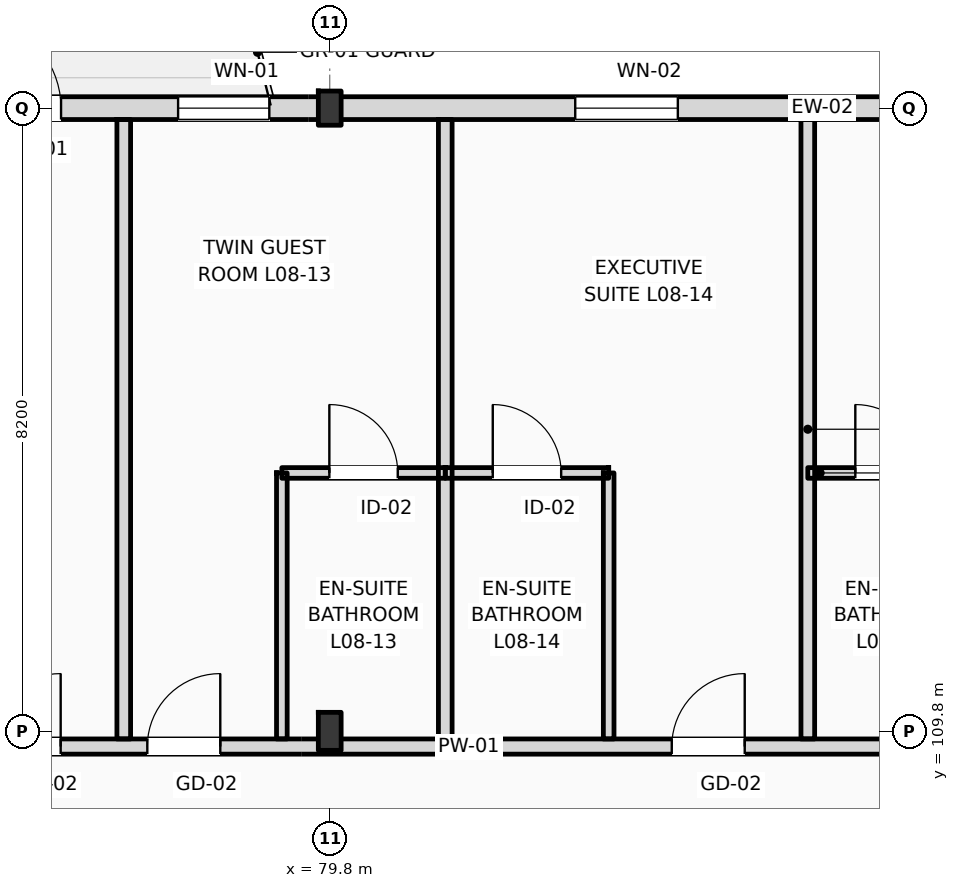
"""IFC4 building model, lengths in metres.
Left out: names, types, materials, properties, quantities, classifications, styles, units other than length and angle.
Written with IfcOpenShell. Run it as: python <this file> out.ifc"""

import sys

from ifc_helpers import new_model, si_unit, direction, frame, frame_2d, origin, origin_2d, place, context, subcontext, project, spatial, rectangle, i_section, extrude, element, fill, save


model = new_model("IFC4")
c1 = context("Model", 3, precision=1e-05, world=origin(), true_north=direction((0.0, 1.0)))
c2 = subcontext(c1, "Body", "Model", "MODEL_VIEW")
j1 = project(units=[si_unit("LENGTHUNIT", "METRE"), si_unit("PLANEANGLEUNIT", "RADIAN")], contexts=[c1])
p1 = place(None, origin())
s1 = spatial("IfcSite", under=j1, at=p1, CompositionType="ELEMENT")
p2 = place(p1, origin())
s2 = spatial("IfcBuilding", under=s1, at=p2, CompositionType="ELEMENT")
p3 = place(p2, frame((0.0, 0.0, 35.4)))
s3 = spatial("IfcBuildingStorey", under=s2, at=p3, CompositionType="ELEMENT", Elevation=35.4)
p4 = place(p3, frame((79.8, 109.8, 0.0), z_axis=(0.0, 0.0, 1.0), x_axis=(1.0, 0.0, 0.0)))
e1 = element("IfcColumn", 1, at=p4, inside=s3, PredefinedType="COLUMN", context=c2, shape_type="SweptSolid", body=[
    extrude(i_section(OverallWidth=0.3, OverallDepth=0.5, WebThickness=0.014, FlangeThickness=0.028, FilletRadius=0.027, at=origin_2d()), origin(), (0.0, 0.0, 1.0), 3.6),
])
p5 = place(p3, frame((79.8, 118.0, 0.0), z_axis=(0.0, 0.0, 1.0), x_axis=(1.0, 0.0, 0.0)))
e2 = element("IfcColumn", 2, at=p5, inside=s3, PredefinedType="COLUMN", context=c2, shape_type="SweptSolid", body=[
    extrude(i_section(OverallWidth=0.3, OverallDepth=0.45, WebThickness=0.014, FlangeThickness=0.026, FilletRadius=0.027, at=origin_2d()), origin(), (0.0, 0.0, 1.0), 3.6),
])
p6 = place(p3, frame((22.5, 118.0, 0.0), z_axis=(0.0, 0.0, 1.0), x_axis=(1.0, 0.0, 0.0)))
e3 = element("IfcWall", 3, at=p6, inside=s3, PredefinedType="STANDARD", context=c2, shape_type="SweptSolid", body=[
    extrude(rectangle(XDim=72.9, YDim=0.3, at=frame_2d((36.45, 0.0))), origin(), (0.0, 0.0, 1.0), 2.92),
])
p7 = place(p6, frame((0.91, 0.0, 0.9)))
e4 = element("IfcOpeningElement", 4, at=p7, cuts=e3, PredefinedType="OPENING", context=c2, shape_type="SweptSolid", body=[
    extrude(rectangle(XDim=0.9, YDim=1.84, at=frame_2d((0.45, 0.92))), frame((0.0, 0.16, 0.0), z_axis=(0.0, -1.0, 0.0), x_axis=(1.0, 0.0, 0.0)), (0.0, 0.0, 1.0), 0.32),
])
p8 = place(p6, frame((6.665, 0.0, 0.0)))
e5 = element("IfcOpeningElement", 5, at=p8, cuts=e3, PredefinedType="OPENING", context=c2, shape_type="SweptSolid", body=[
    extrude(rectangle(XDim=1.2, YDim=2.25, at=frame_2d((0.6, 1.125))), frame((0.0, 0.16, 0.0), z_axis=(0.0, -1.0, 0.0), x_axis=(1.0, 0.0, 0.0)), (0.0, 0.0, 1.0), 0.32),
])
p9 = place(p6, frame((11.355, 0.0, 0.9)))
e6 = element("IfcOpeningElement", 6, at=p9, cuts=e3, PredefinedType="OPENING", context=c2, shape_type="SweptSolid", body=[
    extrude(rectangle(XDim=1.1, YDim=1.5, at=frame_2d((0.55, 0.75))), frame((0.0, 0.16, 0.0), z_axis=(0.0, -1.0, 0.0), x_axis=(1.0, 0.0, 0.0)), (0.0, 0.0, 1.0), 0.32),
])
p10 = place(p6, frame((15.58, 0.0, 0.9)))
e7 = element("IfcOpeningElement", 7, at=p10, cuts=e3, PredefinedType="OPENING", context=c2, shape_type="SweptSolid", body=[
    extrude(rectangle(XDim=1.25, YDim=1.6, at=frame_2d((0.625, 0.8))), frame((0.0, 0.16, 0.0), z_axis=(0.0, -1.0, 0.0), x_axis=(1.0, 0.0, 0.0)), (0.0, 0.0, 1.0), 0.32),
])
p11 = place(p6, frame((21.08, 0.0, 0.0)))
e8 = element("IfcOpeningElement", 8, at=p11, cuts=e3, PredefinedType="OPENING", context=c2, shape_type="SweptSolid", body=[
    extrude(rectangle(XDim=1.2, YDim=2.25, at=frame_2d((0.6, 1.125))), frame((0.0, 0.16, 0.0), z_axis=(0.0, -1.0, 0.0), x_axis=(1.0, 0.0, 0.0)), (0.0, 0.0, 1.0), 0.32),
])
p12 = place(p6, frame((23.54, 0.0, 0.0)))
e9 = element("IfcOpeningElement", 9, at=p12, cuts=e3, PredefinedType="OPENING", context=c2, shape_type="SweptSolid", body=[
    extrude(rectangle(XDim=1.2, YDim=2.25, at=frame_2d((0.6, 1.125))), frame((0.0, 0.16, 0.0), z_axis=(0.0, -1.0, 0.0), x_axis=(1.0, 0.0, 0.0)), (0.0, 0.0, 1.0), 0.32),
])
p13 = place(p6, frame((28.83, 0.0, 0.9)))
e10 = element("IfcOpeningElement", 10, at=p13, cuts=e3, PredefinedType="OPENING", context=c2, shape_type="SweptSolid", body=[
    extrude(rectangle(XDim=1.75, YDim=1.84, at=frame_2d((0.875, 0.92))), frame((0.0, 0.16, 0.0), z_axis=(0.0, -1.0, 0.0), x_axis=(1.0, 0.0, 0.0)), (0.0, 0.0, 1.0), 0.32),
])
p14 = place(p6, frame((34.805, 0.0, 0.9)))
e11 = element("IfcOpeningElement", 11, at=p14, cuts=e3, PredefinedType="OPENING", context=c2, shape_type="SweptSolid", body=[
    extrude(rectangle(XDim=1.35, YDim=1.84, at=frame_2d((0.675, 0.92))), frame((0.0, 0.16, 0.0), z_axis=(0.0, -1.0, 0.0), x_axis=(1.0, 0.0, 0.0)), (0.0, 0.0, 1.0), 0.32),
])
p15 = place(p6, frame((38.105, 0.0, 0.0)))
e12 = element("IfcOpeningElement", 12, at=p15, cuts=e3, PredefinedType="OPENING", context=c2, shape_type="SweptSolid", body=[
    extrude(rectangle(XDim=1.2, YDim=2.25, at=frame_2d((0.6, 1.125))), frame((0.0, 0.16, 0.0), z_axis=(0.0, -1.0, 0.0), x_axis=(1.0, 0.0, 0.0)), (0.0, 0.0, 1.0), 0.32),
])
p16 = place(p6, frame((42.505, 0.0, 0.9)))
e13 = element("IfcOpeningElement", 13, at=p16, cuts=e3, PredefinedType="OPENING", context=c2, shape_type="SweptSolid", body=[
    extrude(rectangle(XDim=2.6, YDim=1.84, at=frame_2d((1.3, 0.92))), frame((0.0, 0.16, 0.0), z_axis=(0.0, -1.0, 0.0), x_axis=(1.0, 0.0, 0.0)), (0.0, 0.0, 1.0), 0.32),
])
p17 = place(p6, frame((46.2, 0.0, 0.9)))
e14 = element("IfcOpeningElement", 14, at=p17, cuts=e3, PredefinedType="OPENING", context=c2, shape_type="SweptSolid", body=[
    extrude(rectangle(XDim=1.8, YDim=1.84, at=frame_2d((0.9, 0.92))), frame((0.0, 0.16, 0.0), z_axis=(0.0, -1.0, 0.0), x_axis=(1.0, 0.0, 0.0)), (0.0, 0.0, 1.0), 0.32),
])
p18 = place(p6, frame((52.565, 0.0, 0.0)))
e15 = element("IfcOpeningElement", 15, at=p18, cuts=e3, PredefinedType="OPENING", context=c2, shape_type="SweptSolid", body=[
    extrude(rectangle(XDim=1.2, YDim=2.25, at=frame_2d((0.6, 1.125))), frame((0.0, 0.16, 0.0), z_axis=(0.0, -1.0, 0.0), x_axis=(1.0, 0.0, 0.0)), (0.0, 0.0, 1.0), 0.32),
])
p19 = place(p6, frame((55.305, 0.0, 0.9)))
e16 = element("IfcOpeningElement", 16, at=p19, cuts=e3, PredefinedType="OPENING", context=c2, shape_type="SweptSolid", body=[
    extrude(rectangle(XDim=1.2, YDim=1.8, at=frame_2d((0.6, 0.9))), frame((0.0, 0.16, 0.0), z_axis=(0.0, -1.0, 0.0), x_axis=(1.0, 0.0, 0.0)), (0.0, 0.0, 1.0), 0.32),
])
p20 = place(p6, frame((60.53, 0.0, 0.9)))
e17 = element("IfcOpeningElement", 17, at=p20, cuts=e3, PredefinedType="OPENING", context=c2, shape_type="SweptSolid", body=[
    extrude(rectangle(XDim=1.35, YDim=1.84, at=frame_2d((0.675, 0.92))), frame((0.0, 0.16, 0.0), z_axis=(0.0, -1.0, 0.0), x_axis=(1.0, 0.0, 0.0)), (0.0, 0.0, 1.0), 0.32),
])
p21 = place(p6, frame((65.955, 0.0, 0.9)))
e18 = element("IfcOpeningElement", 18, at=p21, cuts=e3, PredefinedType="OPENING", context=c2, shape_type="SweptSolid", body=[
    extrude(rectangle(XDim=1.35, YDim=1.84, at=frame_2d((0.675, 0.92))), frame((0.0, 0.16, 0.0), z_axis=(0.0, -1.0, 0.0), x_axis=(1.0, 0.0, 0.0)), (0.0, 0.0, 1.0), 0.32),
])
p22 = place(p6, frame((69.335, 0.0, 0.9)))
e19 = element("IfcOpeningElement", 19, at=p22, cuts=e3, PredefinedType="OPENING", context=c2, shape_type="SweptSolid", body=[
    extrude(rectangle(XDim=1.65, YDim=1.84, at=frame_2d((0.825, 0.92))), frame((0.0, 0.16, 0.0), z_axis=(0.0, -1.0, 0.0), x_axis=(1.0, 0.0, 0.0)), (0.0, 0.0, 1.0), 0.32),
])
p23 = place(p3, frame((10.65, 109.6, 0.0), z_axis=(0.0, 0.0, 1.0), x_axis=(1.0, 0.0, 0.0)))
e20 = element("IfcWall", 20, at=p23, inside=s3, PredefinedType="PARTITIONING", context=c2, shape_type="SweptSolid", body=[
    extrude(rectangle(XDim=84.61, YDim=0.2, at=frame_2d((42.305, 0.0))), origin(), (0.0, 0.0, 1.0), 2.82),
])
p24 = place(p23, frame((12.675, 0.0, 0.0)))
e21 = element("IfcOpeningElement", 21, at=p24, cuts=e20, PredefinedType="OPENING", context=c2, shape_type="SweptSolid", body=[
    extrude(rectangle(XDim=1.02, YDim=2.2, at=frame_2d((0.51, 1.1))), frame((0.0, 0.11, 0.0), z_axis=(0.0, -1.0, 0.0), x_axis=(1.0, 0.0, 0.0)), (0.0, 0.0, 1.0), 0.22),
])
p25 = place(p23, frame((19.62, 0.0, 0.0)))
e22 = element("IfcOpeningElement", 22, at=p25, cuts=e20, PredefinedType="OPENING", context=c2, shape_type="SweptSolid", body=[
    extrude(rectangle(XDim=1.02, YDim=2.2, at=frame_2d((0.51, 1.1))), frame((0.0, 0.11, 0.0), z_axis=(0.0, -1.0, 0.0), x_axis=(1.0, 0.0, 0.0)), (0.0, 0.0, 1.0), 0.22),
])
p26 = place(p23, frame((24.12, 0.0, 0.0)))
e23 = element("IfcOpeningElement", 23, at=p26, cuts=e20, PredefinedType="OPENING", context=c2, shape_type="SweptSolid", body=[
    extrude(rectangle(XDim=1.02, YDim=2.2, at=frame_2d((0.51, 1.1))), frame((0.0, 0.11, 0.0), z_axis=(0.0, -1.0, 0.0), x_axis=(1.0, 0.0, 0.0)), (0.0, 0.0, 1.0), 0.22),
])
p27 = place(p23, frame((26.47, 0.0, 0.0)))
e24 = element("IfcOpeningElement", 24, at=p27, cuts=e20, PredefinedType="OPENING", context=c2, shape_type="SweptSolid", body=[
    extrude(rectangle(XDim=1.02, YDim=2.2, at=frame_2d((0.51, 1.1))), frame((0.0, 0.11, 0.0), z_axis=(0.0, -1.0, 0.0), x_axis=(1.0, 0.0, 0.0)), (0.0, 0.0, 1.0), 0.22),
])
p28 = place(p23, frame((33.15, 0.0, 0.0)))
e25 = element("IfcOpeningElement", 25, at=p28, cuts=e20, PredefinedType="OPENING", context=c2, shape_type="SweptSolid", body=[
    extrude(rectangle(XDim=0.96, YDim=2.2, at=frame_2d((0.48, 1.1))), frame((0.0, 0.11, 0.0), z_axis=(0.0, -1.0, 0.0), x_axis=(1.0, 0.0, 0.0)), (0.0, 0.0, 1.0), 0.22),
])
p29 = place(p23, frame((35.5, 0.0, 0.0)))
e26 = element("IfcOpeningElement", 26, at=p29, cuts=e20, PredefinedType="OPENING", context=c2, shape_type="SweptSolid", body=[
    extrude(rectangle(XDim=0.96, YDim=2.2, at=frame_2d((0.48, 1.1))), frame((0.0, 0.11, 0.0), z_axis=(0.0, -1.0, 0.0), x_axis=(1.0, 0.0, 0.0)), (0.0, 0.0, 1.0), 0.22),
])
p30 = place(p23, frame((42.15, 0.0, 0.0)))
e27 = element("IfcOpeningElement", 27, at=p30, cuts=e20, PredefinedType="OPENING", context=c2, shape_type="SweptSolid", body=[
    extrude(rectangle(XDim=0.96, YDim=2.2, at=frame_2d((0.48, 1.1))), frame((0.0, 0.11, 0.0), z_axis=(0.0, -1.0, 0.0), x_axis=(1.0, 0.0, 0.0)), (0.0, 0.0, 1.0), 0.22),
])
p31 = place(p23, frame((47.15, 0.0, 0.0)))
e28 = element("IfcOpeningElement", 28, at=p31, cuts=e20, PredefinedType="OPENING", context=c2, shape_type="SweptSolid", body=[
    extrude(rectangle(XDim=0.96, YDim=2.2, at=frame_2d((0.48, 1.1))), frame((0.0, 0.11, 0.0), z_axis=(0.0, -1.0, 0.0), x_axis=(1.0, 0.0, 0.0)), (0.0, 0.0, 1.0), 0.22),
])
p32 = place(p23, frame((51.15, 0.0, 0.0)))
e29 = element("IfcOpeningElement", 29, at=p32, cuts=e20, PredefinedType="OPENING", context=c2, shape_type="SweptSolid", body=[
    extrude(rectangle(XDim=0.96, YDim=2.2, at=frame_2d((0.48, 1.1))), frame((0.0, 0.11, 0.0), z_axis=(0.0, -1.0, 0.0), x_axis=(1.0, 0.0, 0.0)), (0.0, 0.0, 1.0), 0.22),
])
p33 = place(p23, frame((55.65, 0.0, 0.0)))
e30 = element("IfcOpeningElement", 30, at=p33, cuts=e20, PredefinedType="OPENING", context=c2, shape_type="SweptSolid", body=[
    extrude(rectangle(XDim=0.96, YDim=2.2, at=frame_2d((0.48, 1.1))), frame((0.0, 0.11, 0.0), z_axis=(0.0, -1.0, 0.0), x_axis=(1.0, 0.0, 0.0)), (0.0, 0.0, 1.0), 0.22),
])
p34 = place(p23, frame((58.0, 0.0, 0.0)))
e31 = element("IfcOpeningElement", 31, at=p34, cuts=e20, PredefinedType="OPENING", context=c2, shape_type="SweptSolid", body=[
    extrude(rectangle(XDim=0.96, YDim=2.2, at=frame_2d((0.48, 1.1))), frame((0.0, 0.11, 0.0), z_axis=(0.0, -1.0, 0.0), x_axis=(1.0, 0.0, 0.0)), (0.0, 0.0, 1.0), 0.22),
])
p35 = place(p23, frame((64.65, 0.0, 0.0)))
e32 = element("IfcOpeningElement", 32, at=p35, cuts=e20, PredefinedType="OPENING", context=c2, shape_type="SweptSolid", body=[
    extrude(rectangle(XDim=0.96, YDim=2.2, at=frame_2d((0.48, 1.1))), frame((0.0, 0.11, 0.0), z_axis=(0.0, -1.0, 0.0), x_axis=(1.0, 0.0, 0.0)), (0.0, 0.0, 1.0), 0.22),
])
p36 = place(p23, frame((66.75, 0.0, 0.0)))
e33 = element("IfcOpeningElement", 33, at=p36, cuts=e20, PredefinedType="OPENING", context=c2, shape_type="SweptSolid", body=[
    extrude(rectangle(XDim=0.96, YDim=2.2, at=frame_2d((0.48, 1.1))), frame((0.0, 0.11, 0.0), z_axis=(0.0, -1.0, 0.0), x_axis=(1.0, 0.0, 0.0)), (0.0, 0.0, 1.0), 0.22),
])
p37 = place(p23, frame((73.65, 0.0, 0.0)))
e34 = element("IfcOpeningElement", 34, at=p37, cuts=e20, PredefinedType="OPENING", context=c2, shape_type="SweptSolid", body=[
    extrude(rectangle(XDim=0.96, YDim=2.2, at=frame_2d((0.48, 1.1))), frame((0.0, 0.11, 0.0), z_axis=(0.0, -1.0, 0.0), x_axis=(1.0, 0.0, 0.0)), (0.0, 0.0, 1.0), 0.22),
])
p38 = place(p23, frame((78.4, 0.0, 0.0)))
e35 = element("IfcOpeningElement", 35, at=p38, cuts=e20, PredefinedType="OPENING", context=c2, shape_type="SweptSolid", body=[
    extrude(rectangle(XDim=0.96, YDim=2.2, at=frame_2d((0.48, 1.1))), frame((0.0, 0.11, 0.0), z_axis=(0.0, -1.0, 0.0), x_axis=(1.0, 0.0, 0.0)), (0.0, 0.0, 1.0), 0.22),
])
p39 = place(p23, frame((80.455, 0.0, 0.0)))
e36 = element("IfcOpeningElement", 36, at=p39, cuts=e20, PredefinedType="OPENING", context=c2, shape_type="SweptSolid", body=[
    extrude(rectangle(XDim=0.96, YDim=2.2, at=frame_2d((0.48, 1.1))), frame((0.0, 0.11, 0.0), z_axis=(0.0, -1.0, 0.0), x_axis=(1.0, 0.0, 0.0)), (0.0, 0.0, 1.0), 0.22),
])
p40 = place(p23, frame((2.716, 0.0, 0.0)))
e37 = element("IfcOpeningElement", 37, at=p40, cuts=e20, PredefinedType="OPENING", context=c2, shape_type="SweptSolid", body=[
    extrude(rectangle(XDim=1.35, YDim=2.25, at=frame_2d((0.675, 1.125))), frame((0.0, 0.11, 0.0), z_axis=(0.0, -1.0, 0.0), x_axis=(1.0, 0.0, 0.0)), (0.0, 0.0, 1.0), 0.22),
])
p41 = place(p23, frame((6.65, 0.0, 0.0)))
e38 = element("IfcOpeningElement", 38, at=p41, cuts=e20, PredefinedType="OPENING", context=c2, shape_type="SweptSolid", body=[
    extrude(rectangle(XDim=1.35, YDim=2.25, at=frame_2d((0.675, 1.125))), frame((0.0, 0.11, 0.0), z_axis=(0.0, -1.0, 0.0), x_axis=(1.0, 0.0, 0.0)), (0.0, 0.0, 1.0), 0.22),
])
p42 = place(p23, frame((10.583, 0.0, 0.0)))
e39 = element("IfcOpeningElement", 39, at=p42, cuts=e20, PredefinedType="OPENING", context=c2, shape_type="SweptSolid", body=[
    extrude(rectangle(XDim=1.35, YDim=2.25, at=frame_2d((0.675, 1.125))), frame((0.0, 0.11, 0.0), z_axis=(0.0, -1.0, 0.0), x_axis=(1.0, 0.0, 0.0)), (0.0, 0.0, 1.0), 0.22),
])
p43 = place(p3, frame((77.09, 109.7, 0.0), z_axis=(0.0, 0.0, 1.0), x_axis=(0.0, 1.0, 0.0)))
e40 = element("IfcWall", 40, at=p43, inside=s3, PredefinedType="PARTITIONING", context=c2, shape_type="SweptSolid", body=[
    extrude(rectangle(XDim=8.15, YDim=0.18, at=frame_2d((4.075, 0.0))), origin(), (0.0, 0.0, 1.0), 3.07),
])
p44 = place(p3, frame((81.32, 109.7, 0.0), z_axis=(0.0, 0.0, 1.0), x_axis=(0.0, 1.0, 0.0)))
e41 = element("IfcWall", 41, at=p44, inside=s3, PredefinedType="PARTITIONING", context=c2, shape_type="SweptSolid", body=[
    extrude(rectangle(XDim=8.15, YDim=0.18, at=frame_2d((4.075, 0.0))), origin(), (0.0, 0.0, 1.0), 3.38),
])
p45 = place(p3, frame((79.17, 109.7, 0.0), z_axis=(0.0, 0.0, 1.0), x_axis=(0.0, 1.0, 0.0)))
e42 = element("IfcWall", 42, at=p45, inside=s3, PredefinedType="PARTITIONING", context=c2, shape_type="SweptSolid", body=[
    extrude(rectangle(XDim=3.5, YDim=0.14, at=frame_2d((1.75, 0.0))), origin(), (0.0, 0.0, 1.0), 3.38),
])
p46 = place(p3, frame((79.17, 113.2, 0.0), z_axis=(0.0, 0.0, 1.0), x_axis=(1.0, 0.0, 0.0)))
e43 = element("IfcWall", 43, at=p46, inside=s3, PredefinedType="PARTITIONING", context=c2, shape_type="SweptSolid", body=[
    extrude(rectangle(XDim=2.15, YDim=0.14, at=frame_2d((1.075, 0.0))), origin(), (0.0, 0.0, 1.0), 3.38),
])
p47 = place(p46, frame((0.625, 0.0, 0.0)))
e44 = element("IfcOpeningElement", 44, at=p47, cuts=e43, PredefinedType="OPENING", context=c2, shape_type="SweptSolid", body=[
    extrude(rectangle(XDim=0.9, YDim=2.1, at=frame_2d((0.45, 1.05))), frame((0.0, 0.08, 0.0), z_axis=(0.0, -1.0, 0.0), x_axis=(1.0, 0.0, 0.0)), (0.0, 0.0, 1.0), 0.16),
])
p48 = place(p3, frame((86.09, 109.7, 0.0), z_axis=(0.0, 0.0, 1.0), x_axis=(0.0, 1.0, 0.0)))
e45 = element("IfcWall", 45, at=p48, inside=s3, PredefinedType="PARTITIONING", context=c2, shape_type="SweptSolid", body=[
    extrude(rectangle(XDim=8.15, YDim=0.18, at=frame_2d((4.075, 0.0))), origin(), (0.0, 0.0, 1.0), 3.38),
])
p49 = place(p3, frame((83.47, 109.7, 0.0), z_axis=(0.0, 0.0, 1.0), x_axis=(0.0, 1.0, 0.0)))
e46 = element("IfcWall", 46, at=p49, inside=s3, PredefinedType="PARTITIONING", context=c2, shape_type="SweptSolid", body=[
    extrude(rectangle(XDim=3.5, YDim=0.14, at=frame_2d((1.75, 0.0))), origin(), (0.0, 0.0, 1.0), 3.38),
])
p50 = place(p3, frame((81.32, 113.2, 0.0), z_axis=(0.0, 0.0, 1.0), x_axis=(1.0, 0.0, 0.0)))
e47 = element("IfcWall", 47, at=p50, inside=s3, PredefinedType="PARTITIONING", context=c2, shape_type="SweptSolid", body=[
    extrude(rectangle(XDim=2.15, YDim=0.14, at=frame_2d((1.075, 0.0))), origin(), (0.0, 0.0, 1.0), 3.38),
])
p51 = place(p50, frame((0.625, 0.0, 0.0)))
e48 = element("IfcOpeningElement", 48, at=p51, cuts=e47, PredefinedType="OPENING", context=c2, shape_type="SweptSolid", body=[
    extrude(rectangle(XDim=0.9, YDim=2.1, at=frame_2d((0.45, 1.05))), frame((0.0, 0.08, 0.0), z_axis=(0.0, -1.0, 0.0), x_axis=(1.0, 0.0, 0.0)), (0.0, 0.0, 1.0), 0.16),
])
p52 = place(p3, frame((86.09, 113.2, 0.0), z_axis=(0.0, 0.0, 1.0), x_axis=(1.0, 0.0, 0.0)))
e49 = element("IfcWall", 49, at=p52, inside=s3, PredefinedType="PARTITIONING", context=c2, shape_type="SweptSolid", body=[
    extrude(rectangle(XDim=2.15, YDim=0.14, at=frame_2d((1.075, 0.0))), origin(), (0.0, 0.0, 1.0), 3.38),
])
p53 = place(p52, frame((0.625, 0.0, 0.0)))
e50 = element("IfcOpeningElement", 50, at=p53, cuts=e49, PredefinedType="OPENING", context=c2, shape_type="SweptSolid", body=[
    extrude(rectangle(XDim=0.9, YDim=2.1, at=frame_2d((0.45, 1.05))), frame((0.0, 0.08, 0.0), z_axis=(0.0, -1.0, 0.0), x_axis=(1.0, 0.0, 0.0)), (0.0, 0.0, 1.0), 0.16),
])
p54 = place(p18, origin())
e51 = element("IfcDoor", 51, at=p54, inside=s3, OperationType="SINGLE_SWING_LEFT", PredefinedType="DOOR", context=c2, shape_type="SweptSolid", body=[
    extrude(rectangle(XDim=1.2, YDim=2.25, at=frame_2d((0.6, 1.125))), frame((0.0, 0.025, 0.0), z_axis=(0.0, -1.0, 0.0), x_axis=(1.0, 0.0, 0.0)), (0.0, 0.0, 1.0), 0.05),
])
fill(e15, e51)
p55 = place(p19, origin())
e52 = element("IfcWindow", 52, at=p55, inside=s3, PartitioningType="DOUBLE_PANEL_VERTICAL", PredefinedType="WINDOW", context=c2, shape_type="SweptSolid", body=[
    extrude(rectangle(XDim=1.2, YDim=1.8, at=frame_2d((0.6, 0.9))), frame((0.0, 0.03, 0.0), z_axis=(0.0, -1.0, 0.0), x_axis=(1.0, 0.0, 0.0)), (0.0, 0.0, 1.0), 0.06),
])
fill(e16, e52)
p56 = place(p20, origin())
e53 = element("IfcWindow", 53, at=p56, inside=s3, PartitioningType="DOUBLE_PANEL_VERTICAL", PredefinedType="WINDOW", context=c2, shape_type="SweptSolid", body=[
    extrude(rectangle(XDim=1.35, YDim=1.84, at=frame_2d((0.675, 0.92))), frame((0.0, 0.03, 0.0), z_axis=(0.0, -1.0, 0.0), x_axis=(1.0, 0.0, 0.0)), (0.0, 0.0, 1.0), 0.06),
])
fill(e17, e53)
p57 = place(p35, origin())
e54 = element("IfcDoor", 54, at=p57, inside=s3, OperationType="SINGLE_SWING_RIGHT", PredefinedType="DOOR", context=c2, shape_type="SweptSolid", body=[
    extrude(rectangle(XDim=0.96, YDim=2.2, at=frame_2d((0.48, 1.1))), frame((0.0, 0.025, 0.0), z_axis=(0.0, -1.0, 0.0), x_axis=(1.0, 0.0, 0.0)), (0.0, 0.0, 1.0), 0.05),
])
fill(e32, e54)
p58 = place(p36, origin())
e55 = element("IfcDoor", 55, at=p58, inside=s3, OperationType="SINGLE_SWING_RIGHT", PredefinedType="DOOR", context=c2, shape_type="SweptSolid", body=[
    extrude(rectangle(XDim=0.96, YDim=2.2, at=frame_2d((0.48, 1.1))), frame((0.0, 0.025, 0.0), z_axis=(0.0, -1.0, 0.0), x_axis=(1.0, 0.0, 0.0)), (0.0, 0.0, 1.0), 0.05),
])
fill(e33, e55)
p59 = place(p47, origin())
e56 = element("IfcDoor", 56, at=p59, inside=s3, OperationType="SINGLE_SWING_LEFT", PredefinedType="DOOR", context=c2, shape_type="SweptSolid", body=[
    extrude(rectangle(XDim=0.9, YDim=2.1, at=frame_2d((0.45, 1.05))), frame((0.0, 0.025, 0.0), z_axis=(0.0, -1.0, 0.0), x_axis=(1.0, 0.0, 0.0)), (0.0, 0.0, 1.0), 0.05),
])
fill(e44, e56)
p60 = place(p37, origin())
e57 = element("IfcDoor", 57, at=p60, inside=s3, OperationType="SINGLE_SWING_RIGHT", PredefinedType="DOOR", context=c2, shape_type="SweptSolid", body=[
    extrude(rectangle(XDim=0.96, YDim=2.2, at=frame_2d((0.48, 1.1))), frame((0.0, 0.025, 0.0), z_axis=(0.0, -1.0, 0.0), x_axis=(1.0, 0.0, 0.0)), (0.0, 0.0, 1.0), 0.05),
])
fill(e34, e57)
p61 = place(p51, origin())
e58 = element("IfcDoor", 58, at=p61, inside=s3, OperationType="SINGLE_SWING_LEFT", PredefinedType="DOOR", context=c2, shape_type="SweptSolid", body=[
    extrude(rectangle(XDim=0.9, YDim=2.1, at=frame_2d((0.45, 1.05))), frame((0.0, 0.025, 0.0), z_axis=(0.0, -1.0, 0.0), x_axis=(1.0, 0.0, 0.0)), (0.0, 0.0, 1.0), 0.05),
])
fill(e48, e58)
p62 = place(p53, origin())
e59 = element("IfcDoor", 59, at=p62, inside=s3, OperationType="SINGLE_SWING_LEFT", PredefinedType="DOOR", context=c2, shape_type="SweptSolid", body=[
    extrude(rectangle(XDim=0.9, YDim=2.1, at=frame_2d((0.45, 1.05))), frame((0.0, 0.025, 0.0), z_axis=(0.0, -1.0, 0.0), x_axis=(1.0, 0.0, 0.0)), (0.0, 0.0, 1.0), 0.05),
])
fill(e50, e59)
save(model, sys.argv[1])
